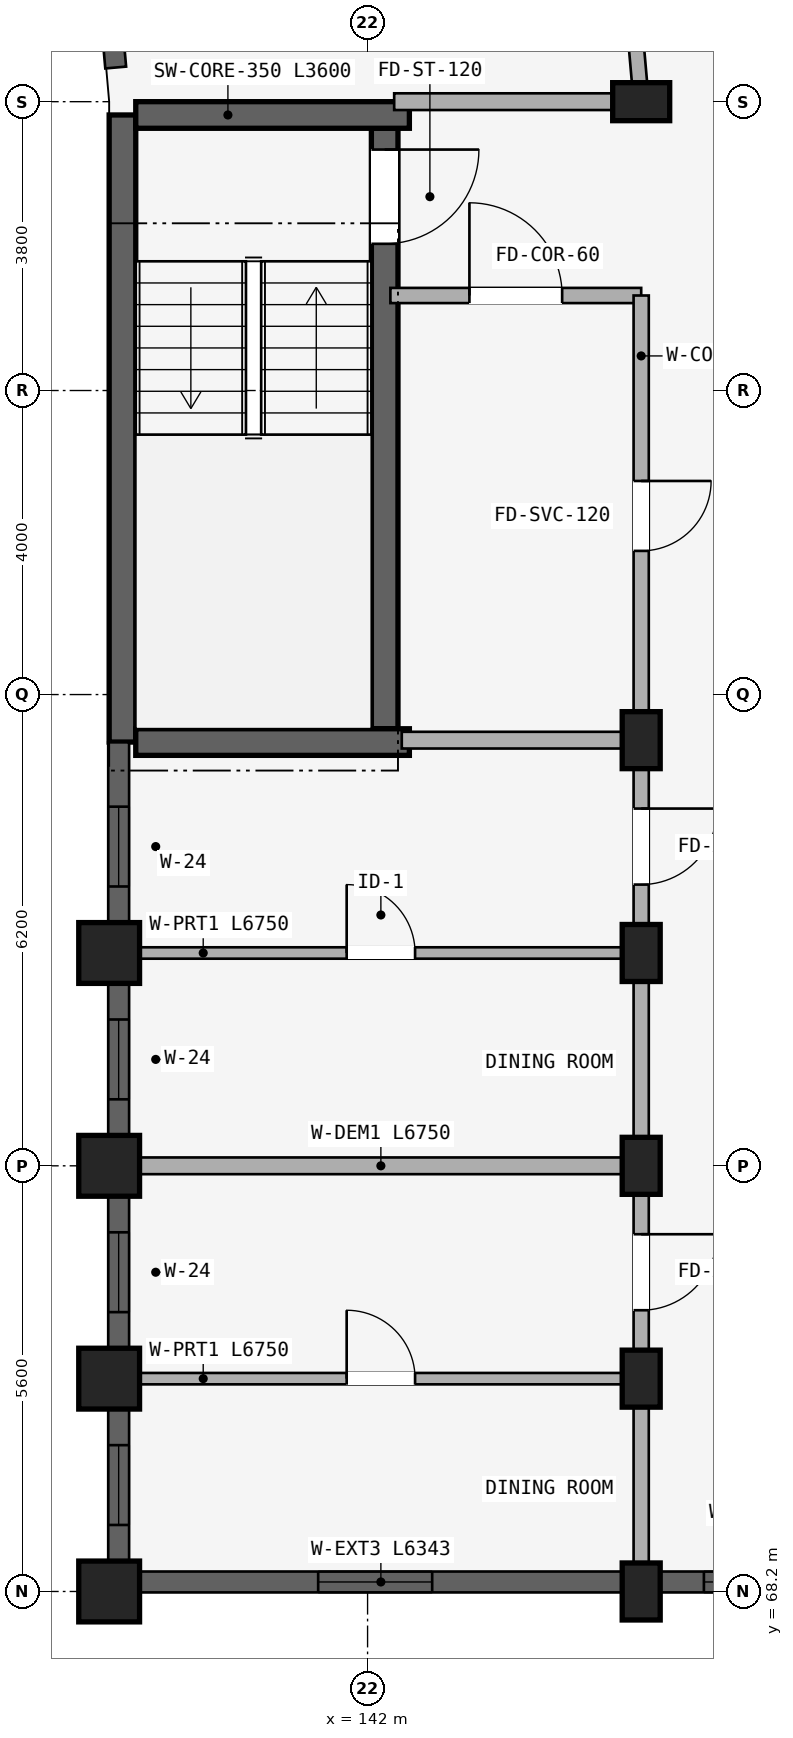
"""IFC4 building model, lengths in metres.
Left out: names, types, materials, properties, quantities, classifications, styles, units other than length and angle.
Written with IfcOpenShell. Run it as: python <this file> out.ifc"""

import sys

from ifc_helpers import new_model, si_unit, direction, frame, frame_2d, origin, origin_2d, place, context, subcontext, project, spatial, rectangle, extrude, element, fill, save


model = new_model("IFC4")
c1 = context("Model", 3, precision=1e-05, world=origin(), true_north=direction((0.0, 1.0)))
c2 = subcontext(c1, "Body", "Model", "MODEL_VIEW")
j1 = project(units=[si_unit("LENGTHUNIT", "METRE"), si_unit("PLANEANGLEUNIT", "RADIAN")], contexts=[c1])
p1 = place(None, origin())
s1 = spatial("IfcSite", under=j1, at=p1, CompositionType="ELEMENT")
p2 = place(p1, origin())
s2 = spatial("IfcBuilding", under=s1, at=p2, CompositionType="ELEMENT")
p3 = place(p2, frame((0.0, 0.0, 8.7)))
s3 = spatial("IfcBuildingStorey", under=s2, at=p3, CompositionType="ELEMENT", Elevation=8.7)
p4 = place(p3, frame((138.775, 87.625, 0.0), z_axis=(0.0, 0.0, 1.0), x_axis=(0.0, -1.0, 0.0)))
e1 = element("IfcWall", 1, at=p4, inside=s3, PredefinedType="SHEAR", context=c2, shape_type="SweptSolid", body=[
    extrude(rectangle(XDim=8.25, YDim=0.35, at=frame_2d((4.125, 0.0))), origin(), (0.0, 0.0, 1.0), 2.93),
])
p5 = place(p3, frame((142.225, 87.45, 0.0), z_axis=(0.0, 0.0, 1.0), x_axis=(0.0, -1.0, 0.0)))
e2 = element("IfcWall", 2, at=p5, inside=s3, PredefinedType="SHEAR", context=c2, shape_type="SweptSolid", body=[
    extrude(rectangle(XDim=7.9, YDim=0.35, at=frame_2d((3.95, 0.0))), origin(), (0.0, 0.0, 1.0), 2.93),
])
p6 = place(p5, frame((0.28, 0.0, 0.0)))
e3 = element("IfcOpeningElement", 3, at=p6, cuts=e2, PredefinedType="OPENING", context=c2, shape_type="SweptSolid", body=[
    extrude(rectangle(XDim=1.24, YDim=2.15, at=frame_2d((0.62, 1.075))), frame((0.0, 0.185, 0.0), z_axis=(0.0, -1.0, 0.0), x_axis=(1.0, 0.0, 0.0)), (0.0, 0.0, 1.0), 0.37),
])
for number, where, z_axis, x_axis in (
    (4, (138.95, 87.625, 0.0), (0.0, 0.0, 1.0), (1.0, 0.0, 0.0)),
    (5, (138.95, 79.375, 0.0), (0.0, 0.0, 1.0), (1.0, 0.0, 0.0)),
):
    element("IfcWall", number, at=place(p3, frame(where, z_axis=z_axis, x_axis=x_axis)), inside=s3, PredefinedType="SHEAR", context=c2, shape_type="SweptSolid", body=[
        extrude(rectangle(XDim=3.6, YDim=0.35, at=frame_2d((1.8, 0.0))), origin(), (0.0, 0.0, 1.0), 2.93),
    ])
for number, where, z_axis, x_axis in (
    (6, (145.6, 87.8, 0.0), (0.0, 0.0, 1.0), (0.0, 1.0, 0.0)),
    (7, (145.6, 79.4, 0.0), (0.0, 0.0, 1.0), (1.0, 0.0, 0.0)),
):
    element("IfcColumn", number, at=place(p3, frame(where, z_axis=z_axis, x_axis=x_axis)), inside=s3, PredefinedType="COLUMN", context=c2, shape_type="SweptSolid", body=[
        extrude(rectangle(XDim=0.5, YDim=0.75, at=origin_2d()), origin(), (0.0, 0.0, 1.0), 2.93),
    ])
p7 = place(p3, frame((138.6, 76.6, 0.0), z_axis=(0.0, 0.0, 1.0), x_axis=(1.0, 0.0, 0.0)))
e8 = element("IfcColumn", 8, at=p7, inside=s3, PredefinedType="COLUMN", context=c2, shape_type="SweptSolid", body=[
    extrude(rectangle(XDim=0.8, YDim=0.8, at=origin_2d()), origin(), (0.0, 0.0, 1.0), 2.93),
])
p8 = place(p3, frame((145.6, 76.6, 0.0), z_axis=(0.0, 0.0, 1.0), x_axis=(1.0, 0.0, 0.0)))
e9 = element("IfcColumn", 9, at=p8, inside=s3, PredefinedType="COLUMN", context=c2, shape_type="SweptSolid", body=[
    extrude(rectangle(XDim=0.5, YDim=0.75, at=origin_2d()), origin(), (0.0, 0.0, 1.0), 2.93),
])
p9 = place(p3, frame((138.6, 73.8, 0.0), z_axis=(0.0, 0.0, 1.0), x_axis=(1.0, 0.0, 0.0)))
e10 = element("IfcColumn", 10, at=p9, inside=s3, PredefinedType="COLUMN", context=c2, shape_type="SweptSolid", body=[
    extrude(rectangle(XDim=0.8, YDim=0.8, at=origin_2d()), origin(), (0.0, 0.0, 1.0), 2.93),
])
p10 = place(p3, frame((145.6, 73.8, 0.0), z_axis=(0.0, 0.0, 1.0), x_axis=(1.0, 0.0, 0.0)))
e11 = element("IfcColumn", 11, at=p10, inside=s3, PredefinedType="COLUMN", context=c2, shape_type="SweptSolid", body=[
    extrude(rectangle(XDim=0.5, YDim=0.75, at=origin_2d()), origin(), (0.0, 0.0, 1.0), 2.93),
])
p11 = place(p3, frame((138.6, 71.0, 0.0), z_axis=(0.0, 0.0, 1.0), x_axis=(1.0, 0.0, 0.0)))
e12 = element("IfcColumn", 12, at=p11, inside=s3, PredefinedType="COLUMN", context=c2, shape_type="SweptSolid", body=[
    extrude(rectangle(XDim=0.8, YDim=0.8, at=origin_2d()), origin(), (0.0, 0.0, 1.0), 2.93),
])
p12 = place(p3, frame((145.6, 71.0, 0.0), z_axis=(0.0, 0.0, 1.0), x_axis=(1.0, 0.0, 0.0)))
e13 = element("IfcColumn", 13, at=p12, inside=s3, PredefinedType="COLUMN", context=c2, shape_type="SweptSolid", body=[
    extrude(rectangle(XDim=0.5, YDim=0.75, at=origin_2d()), origin(), (0.0, 0.0, 1.0), 2.93),
])
p13 = place(p3, frame((138.6, 68.2, 0.0), z_axis=(0.0, 0.0, 1.0), x_axis=(1.0, 0.0, 0.0)))
e14 = element("IfcColumn", 14, at=p13, inside=s3, PredefinedType="COLUMN", context=c2, shape_type="SweptSolid", body=[
    extrude(rectangle(XDim=0.8, YDim=0.8, at=origin_2d()), origin(), (0.0, 0.0, 1.0), 2.93),
])
p14 = place(p3, frame((145.6, 68.2, 0.0), z_axis=(0.0, 0.0, 1.0), x_axis=(1.0, 0.0, 0.0)))
e15 = element("IfcColumn", 15, at=p14, inside=s3, PredefinedType="COLUMN", context=c2, shape_type="SweptSolid", body=[
    extrude(rectangle(XDim=0.5, YDim=0.75, at=origin_2d()), origin(), (0.0, 0.0, 1.0), 2.93),
])
p15 = place(p3, frame((142.3, 85.25, 0.0), z_axis=(0.0, 0.0, 1.0), x_axis=(1.0, 0.0, 0.0)))
e16 = element("IfcWall", 16, at=p15, inside=s3, PredefinedType="STANDARD", context=c2, shape_type="SweptSolid", body=[
    extrude(rectangle(XDim=3.3, YDim=0.2, at=frame_2d((1.65, 0.0))), origin(), (0.0, 0.0, 1.0), 2.372),
])
p16 = place(p15, frame((1.04, 0.0, 0.0)))
e17 = element("IfcOpeningElement", 17, at=p16, cuts=e16, PredefinedType="OPENING", context=c2, shape_type="SweptSolid", body=[
    extrude(rectangle(XDim=1.22, YDim=2.15, at=frame_2d((0.61, 1.075))), frame((0.0, 0.11, 0.0), z_axis=(0.0, -1.0, 0.0), x_axis=(1.0, 0.0, 0.0)), (0.0, 0.0, 1.0), 0.22),
])
p17 = place(p3, frame((145.6, 85.25, 0.0), z_axis=(0.0, 0.0, 1.0), x_axis=(0.0, -1.0, 0.0)))
e18 = element("IfcWall", 18, at=p17, inside=s3, PredefinedType="STANDARD", context=c2, shape_type="SweptSolid", body=[
    extrude(rectangle(XDim=5.8, YDim=0.2, at=frame_2d((2.9, 0.0))), origin(), (0.0, 0.0, 1.0), 2.372),
])
p18 = place(p17, frame((2.44, 0.0, 0.0)))
e19 = element("IfcOpeningElement", 19, at=p18, cuts=e18, PredefinedType="OPENING", context=c2, shape_type="SweptSolid", body=[
    extrude(rectangle(XDim=0.92, YDim=2.1, at=frame_2d((0.46, 1.05))), frame((0.0, 0.11, 0.0), z_axis=(0.0, -1.0, 0.0), x_axis=(1.0, 0.0, 0.0)), (0.0, 0.0, 1.0), 0.22),
])
p19 = place(p3, frame((145.208, 92.28, 0.0), z_axis=(0.0, 0.0, 1.0), x_axis=(0.087187153726, -0.996191949488, 0.0)))
e20 = element("IfcWall", 20, at=p19, inside=s3, PredefinedType="STANDARD", context=c2, shape_type="SweptSolid", body=[
    extrude(rectangle(XDim=4.497, YDim=0.2, at=frame_2d((2.249, 0.0))), origin(), (0.0, 0.0, 1.0), 2.372),
])
p20 = place(p3, frame((142.35, 87.8, 0.0), z_axis=(0.0, 0.0, 1.0), x_axis=(1.0, 0.0, 0.0)))
e21 = element("IfcWall", 21, at=p20, inside=s3, PredefinedType="STANDARD", context=c2, shape_type="SweptSolid", body=[
    extrude(rectangle(XDim=3.2, YDim=0.22, at=frame_2d((1.6, 0.0))), origin(), (0.0, 0.0, 1.0), 2.372),
])
p21 = place(p3, frame((145.6, 79.4, 0.0), z_axis=(0.0, 0.0, 1.0), x_axis=(0.0, -1.0, 0.0)))
e22 = element("IfcWall", 22, at=p21, inside=s3, PredefinedType="STANDARD", context=c2, shape_type="SweptSolid", body=[
    extrude(rectangle(XDim=2.8, YDim=0.2, at=frame_2d((1.4, 0.0))), origin(), (0.0, 0.0, 1.0), 2.372),
])
p22 = place(p21, frame((0.9, 0.0, 0.0)))
e23 = element("IfcOpeningElement", 23, at=p22, cuts=e22, PredefinedType="OPENING", context=c2, shape_type="SweptSolid", body=[
    extrude(rectangle(XDim=1.0, YDim=2.15, at=frame_2d((0.5, 1.075))), frame((0.0, 0.11, 0.0), z_axis=(0.0, -1.0, 0.0), x_axis=(1.0, 0.0, 0.0)), (0.0, 0.0, 1.0), 0.22),
])
p23 = place(p3, frame((142.45, 79.4, 0.0), z_axis=(0.0, 0.0, 1.0), x_axis=(1.0, 0.0, 0.0)))
e24 = element("IfcWall", 24, at=p23, inside=s3, PredefinedType="STANDARD", context=c2, shape_type="SweptSolid", body=[
    extrude(rectangle(XDim=3.1, YDim=0.22, at=frame_2d((1.55, 0.0))), origin(), (0.0, 0.0, 1.0), 2.372),
])
p24 = place(p3, frame((145.6, 76.6, 0.0), z_axis=(0.0, 0.0, 1.0), x_axis=(0.0, -1.0, 0.0)))
e25 = element("IfcWall", 25, at=p24, inside=s3, PredefinedType="STANDARD", context=c2, shape_type="SweptSolid", body=[
    extrude(rectangle(XDim=2.8, YDim=0.2, at=frame_2d((1.4, 0.0))), origin(), (0.0, 0.0, 1.0), 2.372),
])
p25 = place(p3, frame((138.8, 76.6, 0.0), z_axis=(0.0, 0.0, 1.0), x_axis=(1.0, 0.0, 0.0)))
e26 = element("IfcWall", 26, at=p25, inside=s3, PredefinedType="PARTITIONING", context=c2, shape_type="SweptSolid", body=[
    extrude(rectangle(XDim=6.75, YDim=0.15, at=frame_2d((3.375, 0.0))), origin(), (0.0, 0.0, 1.0), 2.372),
])
p26 = place(p25, frame((2.925, 0.0, 0.0)))
e27 = element("IfcOpeningElement", 27, at=p26, cuts=e26, PredefinedType="OPENING", context=c2, shape_type="SweptSolid", body=[
    extrude(rectangle(XDim=0.9, YDim=2.1, at=frame_2d((0.45, 1.05))), frame((0.0, 0.085, 0.0), z_axis=(0.0, -1.0, 0.0), x_axis=(1.0, 0.0, 0.0)), (0.0, 0.0, 1.0), 0.17),
])
p27 = place(p3, frame((145.6, 73.8, 0.0), z_axis=(0.0, 0.0, 1.0), x_axis=(0.0, -1.0, 0.0)))
e28 = element("IfcWall", 28, at=p27, inside=s3, PredefinedType="STANDARD", context=c2, shape_type="SweptSolid", body=[
    extrude(rectangle(XDim=2.8, YDim=0.2, at=frame_2d((1.4, 0.0))), origin(), (0.0, 0.0, 1.0), 2.372),
])
p28 = place(p27, frame((0.9, 0.0, 0.0)))
e29 = element("IfcOpeningElement", 29, at=p28, cuts=e28, PredefinedType="OPENING", context=c2, shape_type="SweptSolid", body=[
    extrude(rectangle(XDim=1.0, YDim=2.15, at=frame_2d((0.5, 1.075))), frame((0.0, 0.11, 0.0), z_axis=(0.0, -1.0, 0.0), x_axis=(1.0, 0.0, 0.0)), (0.0, 0.0, 1.0), 0.22),
])
p29 = place(p3, frame((138.8, 73.8, 0.0), z_axis=(0.0, 0.0, 1.0), x_axis=(1.0, 0.0, 0.0)))
e30 = element("IfcWall", 30, at=p29, inside=s3, PredefinedType="STANDARD", context=c2, shape_type="SweptSolid", body=[
    extrude(rectangle(XDim=6.75, YDim=0.22, at=frame_2d((3.375, 0.0))), origin(), (0.0, 0.0, 1.0), 2.372),
])
p30 = place(p3, frame((145.6, 71.0, 0.0), z_axis=(0.0, 0.0, 1.0), x_axis=(0.0, -1.0, 0.0)))
e31 = element("IfcWall", 31, at=p30, inside=s3, PredefinedType="STANDARD", context=c2, shape_type="SweptSolid", body=[
    extrude(rectangle(XDim=2.8, YDim=0.2, at=frame_2d((1.4, 0.0))), origin(), (0.0, 0.0, 1.0), 2.372),
])
p31 = place(p3, frame((138.8, 71.0, 0.0), z_axis=(0.0, 0.0, 1.0), x_axis=(1.0, 0.0, 0.0)))
e32 = element("IfcWall", 32, at=p31, inside=s3, PredefinedType="PARTITIONING", context=c2, shape_type="SweptSolid", body=[
    extrude(rectangle(XDim=6.75, YDim=0.15, at=frame_2d((3.375, 0.0))), origin(), (0.0, 0.0, 1.0), 2.372),
])
p32 = place(p31, frame((2.925, 0.0, 0.0)))
e33 = element("IfcOpeningElement", 33, at=p32, cuts=e32, PredefinedType="OPENING", context=c2, shape_type="SweptSolid", body=[
    extrude(rectangle(XDim=0.9, YDim=2.1, at=frame_2d((0.45, 1.05))), frame((0.0, 0.085, 0.0), z_axis=(0.0, -1.0, 0.0), x_axis=(1.0, 0.0, 0.0)), (0.0, 0.0, 1.0), 0.17),
])
p33 = place(p3, frame((138.463, 90.797, 0.0), z_axis=(0.0, 0.0, 1.0), x_axis=(0.08716102895, -0.996194235595, 0.0)))
e34 = element("IfcWall", 34, at=p33, inside=s3, PredefinedType="STANDARD", context=c2, shape_type="SweptSolid", body=[
    extrude(rectangle(XDim=2.557, YDim=0.275, at=frame_2d((1.279, 0.0))), origin(), (0.0, 0.0, 1.0), 2.472),
])
p34 = place(p33, frame((0.609, 0.0, 0.622)))
e35 = element("IfcOpeningElement", 35, at=p34, cuts=e34, PredefinedType="OPENING", context=c2, shape_type="SweptSolid", body=[
    extrude(rectangle(XDim=1.5, YDim=1.65, at=frame_2d((0.75, 0.825))), frame((0.0, 0.147, 0.0), z_axis=(0.0, -1.0, 0.0), x_axis=(1.0, 0.0, 0.0)), (0.0, 0.0, 1.0), 0.295),
])
p35 = place(p3, frame((138.725, 79.372, 0.0), z_axis=(0.0, 0.0, 1.0), x_axis=(0.0, -1.0, 0.0)))
e36 = element("IfcWall", 36, at=p35, inside=s3, PredefinedType="STANDARD", context=c2, shape_type="SweptSolid", body=[
    extrude(rectangle(XDim=2.368, YDim=0.275, at=frame_2d((1.184, 0.0))), origin(), (0.0, 0.0, 1.0), 2.472),
])
p36 = place(p35, frame((0.846, 0.0, 0.88)))
e37 = element("IfcOpeningElement", 37, at=p36, cuts=e36, PredefinedType="OPENING", context=c2, shape_type="SweptSolid", body=[
    extrude(rectangle(XDim=1.05, YDim=1.25, at=frame_2d((0.525, 0.625))), frame((0.0, 0.147, 0.0), z_axis=(0.0, -1.0, 0.0), x_axis=(1.0, 0.0, 0.0)), (0.0, 0.0, 1.0), 0.295),
])
p37 = place(p3, frame((138.725, 76.197, 0.0), z_axis=(0.0, 0.0, 1.0), x_axis=(0.0, -1.0, 0.0)))
e38 = element("IfcWall", 38, at=p37, inside=s3, PredefinedType="STANDARD", context=c2, shape_type="SweptSolid", body=[
    extrude(rectangle(XDim=1.993, YDim=0.275, at=frame_2d((0.997, 0.0))), origin(), (0.0, 0.0, 1.0), 2.472),
])
p38 = place(p37, frame((0.471, 0.0, 0.88)))
e39 = element("IfcOpeningElement", 39, at=p38, cuts=e38, PredefinedType="OPENING", context=c2, shape_type="SweptSolid", body=[
    extrude(rectangle(XDim=1.05, YDim=1.25, at=frame_2d((0.525, 0.625))), frame((0.0, 0.147, 0.0), z_axis=(0.0, -1.0, 0.0), x_axis=(1.0, 0.0, 0.0)), (0.0, 0.0, 1.0), 0.295),
])
p39 = place(p3, frame((138.725, 73.396, 0.0), z_axis=(0.0, 0.0, 1.0), x_axis=(0.0, -1.0, 0.0)))
e40 = element("IfcWall", 40, at=p39, inside=s3, PredefinedType="STANDARD", context=c2, shape_type="SweptSolid", body=[
    extrude(rectangle(XDim=1.993, YDim=0.275, at=frame_2d((0.997, 0.0))), origin(), (0.0, 0.0, 1.0), 2.472),
])
p40 = place(p39, frame((0.471, 0.0, 0.88)))
e41 = element("IfcOpeningElement", 41, at=p40, cuts=e40, PredefinedType="OPENING", context=c2, shape_type="SweptSolid", body=[
    extrude(rectangle(XDim=1.05, YDim=1.25, at=frame_2d((0.525, 0.625))), frame((0.0, 0.147, 0.0), z_axis=(0.0, -1.0, 0.0), x_axis=(1.0, 0.0, 0.0)), (0.0, 0.0, 1.0), 0.295),
])
p41 = place(p3, frame((138.725, 70.596, 0.0), z_axis=(0.0, 0.0, 1.0), x_axis=(0.0, -1.0, 0.0)))
e42 = element("IfcWall", 42, at=p41, inside=s3, PredefinedType="STANDARD", context=c2, shape_type="SweptSolid", body=[
    extrude(rectangle(XDim=1.993, YDim=0.275, at=frame_2d((0.997, 0.0))), origin(), (0.0, 0.0, 1.0), 2.472),
])
p42 = place(p41, frame((0.471, 0.0, 0.88)))
e43 = element("IfcOpeningElement", 43, at=p42, cuts=e42, PredefinedType="OPENING", context=c2, shape_type="SweptSolid", body=[
    extrude(rectangle(XDim=1.05, YDim=1.25, at=frame_2d((0.525, 0.625))), frame((0.0, 0.147, 0.0), z_axis=(0.0, -1.0, 0.0), x_axis=(1.0, 0.0, 0.0)), (0.0, 0.0, 1.0), 0.295),
])
p43 = place(p3, frame((139.003, 68.325, 0.0), z_axis=(0.0, 0.0, 1.0), x_axis=(1.0, 0.0, 0.0)))
e44 = element("IfcWall", 44, at=p43, inside=s3, PredefinedType="STANDARD", context=c2, shape_type="SweptSolid", body=[
    extrude(rectangle(XDim=6.343, YDim=0.275, at=frame_2d((3.171, 0.0))), origin(), (0.0, 0.0, 1.0), 2.372),
])
p44 = place(p43, frame((2.346, 0.0, 0.522)))
e45 = element("IfcOpeningElement", 45, at=p44, cuts=e44, PredefinedType="OPENING", context=c2, shape_type="SweptSolid", body=[
    extrude(rectangle(XDim=1.5, YDim=1.65, at=frame_2d((0.75, 0.825))), frame((0.0, 0.147, 0.0), z_axis=(0.0, -1.0, 0.0), x_axis=(1.0, 0.0, 0.0)), (0.0, 0.0, 1.0), 0.295),
])
p45 = place(p3, frame((145.854, 68.325, 0.0), z_axis=(0.0, 0.0, 1.0), x_axis=(1.0, 0.0, 0.0)))
e46 = element("IfcWall", 46, at=p45, inside=s3, PredefinedType="STANDARD", context=c2, shape_type="SweptSolid", body=[
    extrude(rectangle(XDim=1.893, YDim=0.275, at=frame_2d((0.947, 0.0))), origin(), (0.0, 0.0, 1.0), 2.372),
])
p46 = place(p45, frame((0.572, 0.0, 0.88)))
e47 = element("IfcOpeningElement", 47, at=p46, cuts=e46, PredefinedType="OPENING", context=c2, shape_type="SweptSolid", body=[
    extrude(rectangle(XDim=0.75, YDim=1.05, at=frame_2d((0.375, 0.525))), frame((0.0, 0.147, 0.0), z_axis=(0.0, -1.0, 0.0), x_axis=(1.0, 0.0, 0.0)), (0.0, 0.0, 1.0), 0.295),
])
p47 = place(p36, origin())
e48 = element("IfcWindow", 48, at=p47, inside=s3, PartitioningType="SINGLE_PANEL", PredefinedType="WINDOW", context=c2, shape_type="SweptSolid", body=[
    extrude(rectangle(XDim=1.05, YDim=1.25, at=frame_2d((0.525, 0.625))), frame((0.0, 0.03, 0.0), z_axis=(0.0, -1.0, 0.0), x_axis=(1.0, 0.0, 0.0)), (0.0, 0.0, 1.0), 0.06),
])
fill(e37, e48)
p48 = place(p38, origin())
e49 = element("IfcWindow", 49, at=p48, inside=s3, PartitioningType="SINGLE_PANEL", PredefinedType="WINDOW", context=c2, shape_type="SweptSolid", body=[
    extrude(rectangle(XDim=1.05, YDim=1.25, at=frame_2d((0.525, 0.625))), frame((0.0, 0.03, 0.0), z_axis=(0.0, -1.0, 0.0), x_axis=(1.0, 0.0, 0.0)), (0.0, 0.0, 1.0), 0.06),
])
fill(e39, e49)
p49 = place(p40, origin())
e50 = element("IfcWindow", 50, at=p49, inside=s3, PartitioningType="SINGLE_PANEL", PredefinedType="WINDOW", context=c2, shape_type="SweptSolid", body=[
    extrude(rectangle(XDim=1.05, YDim=1.25, at=frame_2d((0.525, 0.625))), frame((0.0, 0.03, 0.0), z_axis=(0.0, -1.0, 0.0), x_axis=(1.0, 0.0, 0.0)), (0.0, 0.0, 1.0), 0.06),
])
fill(e41, e50)
p50 = place(p42, origin())
e51 = element("IfcWindow", 51, at=p50, inside=s3, PartitioningType="SINGLE_PANEL", PredefinedType="WINDOW", context=c2, shape_type="SweptSolid", body=[
    extrude(rectangle(XDim=1.05, YDim=1.25, at=frame_2d((0.525, 0.625))), frame((0.0, 0.03, 0.0), z_axis=(0.0, -1.0, 0.0), x_axis=(1.0, 0.0, 0.0)), (0.0, 0.0, 1.0), 0.06),
])
fill(e43, e51)
p51 = place(p44, origin())
e52 = element("IfcWindow", 52, at=p51, inside=s3, PartitioningType="DOUBLE_PANEL_VERTICAL", PredefinedType="WINDOW", context=c2, shape_type="SweptSolid", body=[
    extrude(rectangle(XDim=1.5, YDim=1.65, at=frame_2d((0.75, 0.825))), frame((0.0, 0.03, 0.0), z_axis=(0.0, -1.0, 0.0), x_axis=(1.0, 0.0, 0.0)), (0.0, 0.0, 1.0), 0.06),
])
fill(e45, e52)
p52 = place(p46, origin())
e53 = element("IfcWindow", 53, at=p52, inside=s3, PartitioningType="SINGLE_PANEL", PredefinedType="WINDOW", context=c2, shape_type="SweptSolid", body=[
    extrude(rectangle(XDim=0.75, YDim=1.05, at=frame_2d((0.375, 0.525))), frame((0.0, 0.03, 0.0), z_axis=(0.0, -1.0, 0.0), x_axis=(1.0, 0.0, 0.0)), (0.0, 0.0, 1.0), 0.06),
])
fill(e47, e53)
p53 = place(p6, frame((1.24, 0.0, 0.0), z_axis=(0.0, 0.0, 1.0), x_axis=(-1.0, 0.0, 0.0)))
e54 = element("IfcDoor", 54, at=p53, inside=s3, OperationType="SINGLE_SWING_RIGHT", PredefinedType="DOOR", context=c2, shape_type="SweptSolid", body=[
    extrude(rectangle(XDim=1.24, YDim=2.15, at=frame_2d((0.62, 1.075))), frame((0.0, 0.025, 0.0), z_axis=(0.0, -1.0, 0.0), x_axis=(1.0, 0.0, 0.0)), (0.0, 0.0, 1.0), 0.05),
])
fill(e3, e54)
p54 = place(p16, frame((1.22, 0.0, 0.0), z_axis=(0.0, 0.0, 1.0), x_axis=(-1.0, 0.0, 0.0)))
e55 = element("IfcDoor", 55, at=p54, inside=s3, OperationType="SINGLE_SWING_RIGHT", PredefinedType="DOOR", context=c2, shape_type="SweptSolid", body=[
    extrude(rectangle(XDim=1.22, YDim=2.15, at=frame_2d((0.61, 1.075))), frame((0.0, 0.025, 0.0), z_axis=(0.0, -1.0, 0.0), x_axis=(1.0, 0.0, 0.0)), (0.0, 0.0, 1.0), 0.05),
])
fill(e17, e55)
p55 = place(p18, origin())
e56 = element("IfcDoor", 56, at=p55, inside=s3, OperationType="SINGLE_SWING_LEFT", PredefinedType="DOOR", context=c2, shape_type="SweptSolid", body=[
    extrude(rectangle(XDim=0.92, YDim=2.1, at=frame_2d((0.46, 1.05))), frame((0.0, 0.025, 0.0), z_axis=(0.0, -1.0, 0.0), x_axis=(1.0, 0.0, 0.0)), (0.0, 0.0, 1.0), 0.05),
])
fill(e19, e56)
p56 = place(p22, frame((1.0, 0.0, 0.0), z_axis=(0.0, 0.0, 1.0), x_axis=(-1.0, 0.0, 0.0)))
e57 = element("IfcDoor", 57, at=p56, inside=s3, OperationType="SINGLE_SWING_RIGHT", PredefinedType="DOOR", context=c2, shape_type="SweptSolid", body=[
    extrude(rectangle(XDim=1.0, YDim=2.15, at=frame_2d((0.5, 1.075))), frame((0.0, 0.025, 0.0), z_axis=(0.0, -1.0, 0.0), x_axis=(1.0, 0.0, 0.0)), (0.0, 0.0, 1.0), 0.05),
])
fill(e23, e57)
p57 = place(p26, frame((0.9, 0.0, 0.0), z_axis=(0.0, 0.0, 1.0), x_axis=(-1.0, 0.0, 0.0)))
e58 = element("IfcDoor", 58, at=p57, inside=s3, OperationType="SINGLE_SWING_RIGHT", PredefinedType="DOOR", context=c2, shape_type="SweptSolid", body=[
    extrude(rectangle(XDim=0.9, YDim=2.1, at=frame_2d((0.45, 1.05))), frame((0.0, 0.025, 0.0), z_axis=(0.0, -1.0, 0.0), x_axis=(1.0, 0.0, 0.0)), (0.0, 0.0, 1.0), 0.05),
])
fill(e27, e58)
p58 = place(p28, frame((1.0, 0.0, 0.0), z_axis=(0.0, 0.0, 1.0), x_axis=(-1.0, 0.0, 0.0)))
e59 = element("IfcDoor", 59, at=p58, inside=s3, OperationType="SINGLE_SWING_RIGHT", PredefinedType="DOOR", context=c2, shape_type="SweptSolid", body=[
    extrude(rectangle(XDim=1.0, YDim=2.15, at=frame_2d((0.5, 1.075))), frame((0.0, 0.025, 0.0), z_axis=(0.0, -1.0, 0.0), x_axis=(1.0, 0.0, 0.0)), (0.0, 0.0, 1.0), 0.05),
])
fill(e29, e59)
p59 = place(p32, frame((0.9, 0.0, 0.0), z_axis=(0.0, 0.0, 1.0), x_axis=(-1.0, 0.0, 0.0)))
e60 = element("IfcDoor", 60, at=p59, inside=s3, OperationType="SINGLE_SWING_RIGHT", PredefinedType="DOOR", context=c2, shape_type="SweptSolid", body=[
    extrude(rectangle(XDim=0.9, YDim=2.1, at=frame_2d((0.45, 1.05))), frame((0.0, 0.025, 0.0), z_axis=(0.0, -1.0, 0.0), x_axis=(1.0, 0.0, 0.0)), (0.0, 0.0, 1.0), 0.05),
])
fill(e33, e60)
save(model, sys.argv[1])
